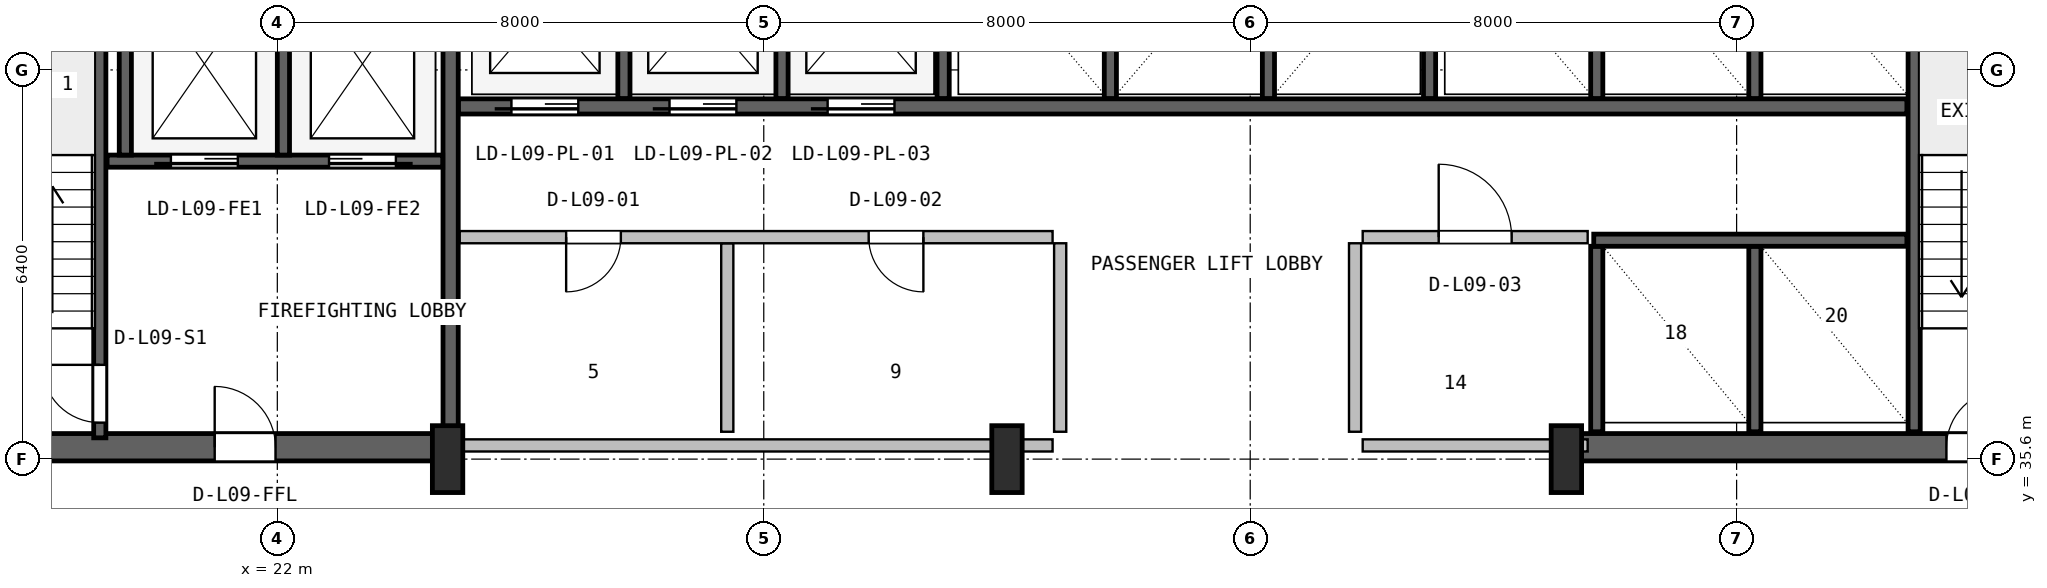
"""IFC4 building model, lengths in metres.
Left out: names, types, materials, properties, quantities, classifications, styles, units other than length and angle.
Written with IfcOpenShell. Run it as: python <this file> out.ifc"""

import sys

from ifc_helpers import new_model, si_unit, direction, frame, frame_2d, origin, origin_2d, place, context, subcontext, project, spatial, rectangle, i_section, extrude, source, transform, mapped, element, fill, save


model = new_model("IFC4")
c1 = context("Model", 3, precision=1e-05, world=origin(), true_north=direction((0.0, 1.0)))
c2 = subcontext(c1, "Body", "Model", "MODEL_VIEW")
j1 = project(units=[si_unit("LENGTHUNIT", "METRE"), si_unit("PLANEANGLEUNIT", "RADIAN")], contexts=[c1])
p1 = place(None, origin())
s1 = spatial("IfcSite", under=j1, at=p1, CompositionType="ELEMENT")
p2 = place(p1, origin())
s2 = spatial("IfcBuilding", under=s1, at=p2, CompositionType="ELEMENT")
p3 = place(p2, frame((0.0, 0.0, 43.2)))
s3 = spatial("IfcBuildingStorey", under=s2, at=p3, CompositionType="ELEMENT", Elevation=43.2)
p4 = place(p3, frame((15.57, 35.795, 0.0), z_axis=(0.0, 0.0, 1.0), x_axis=(1.0, 0.0, 0.0)))
e1 = element("IfcWall", 1, at=p4, inside=s3, PredefinedType="SHEAR", context=c2, shape_type="SweptSolid", body=[
    extrude(rectangle(XDim=9.23, YDim=0.45, at=frame_2d((4.615, 0.0))), origin(), (0.0, 0.0, 1.0), 3.65),
])
p5 = place(p4, frame((5.4, 0.0, 0.0)))
e2 = element("IfcOpeningElement", 2, at=p5, cuts=e1, PredefinedType="OPENING", context=c2, shape_type="SweptSolid", body=[
    extrude(rectangle(XDim=1.0, YDim=2.1, at=frame_2d((0.5, 1.05))), frame((0.0, 0.235, 0.0), z_axis=(0.0, -1.0, 0.0), x_axis=(1.0, 0.0, 0.0)), (0.0, 0.0, 1.0), 0.47),
])
p6 = place(p3, frame((43.2, 35.795, 0.0), z_axis=(0.0, 0.0, 1.0), x_axis=(1.0, 0.0, 0.0)))
e3 = element("IfcWall", 3, at=p6, inside=s3, PredefinedType="SHEAR", context=c2, shape_type="SweptSolid", body=[
    extrude(rectangle(XDim=9.23, YDim=0.45, at=frame_2d((4.615, 0.0))), origin(), (0.0, 0.0, 1.0), 3.65),
])
p7 = place(p6, frame((6.25, 0.0, 0.0)))
e4 = element("IfcOpeningElement", 4, at=p7, cuts=e3, PredefinedType="OPENING", context=c2, shape_type="SweptSolid", body=[
    extrude(rectangle(XDim=0.95, YDim=2.1, at=frame_2d((0.475, 1.05))), frame((0.0, 0.235, 0.0), z_axis=(0.0, -1.0, 0.0), x_axis=(1.0, 0.0, 0.0)), (0.0, 0.0, 1.0), 0.47),
])
m1 = source(origin(), c2, "Body", "SweptSolid", [
    extrude(i_section(OverallWidth=0.5, OverallDepth=1.1, WebThickness=0.018, FlangeThickness=0.032, FilletRadius=0.018, at=origin_2d()), origin(), (0.0, 0.0, 1.0), 3.9),
])
for number, where, z_axis, x_axis in (
    (5, (24.8, 35.6, 0.0), (0.0, 0.0, 1.0), (1.0, 0.0, 0.0)),
    (6, (34.0, 35.6, 0.0), (0.0, 0.0, 1.0), (1.0, 0.0, 0.0)),
    (7, (43.2, 35.6, 0.0), (0.0, 0.0, 1.0), (1.0, 0.0, 0.0)),
):
    element("IfcColumn", number, at=place(p3, frame(where, z_axis=z_axis, x_axis=x_axis)), inside=s3, PredefinedType="COLUMN", context=c2, shape_type="MappedRepresentation", body=[
        mapped(m1, transform((0.0, 0.0, 0.0), x_axis=(1.0, 0.0, 0.0), y_axis=(0.0, 1.0, 0.0), z_axis=(0.0, 0.0, 1.0), scale=1.0)),
    ])
p8 = place(p3, frame((19.08, 35.95, 0.0), z_axis=(0.0, 0.0, 1.0), x_axis=(0.0, 1.0, 0.0)))
e8 = element("IfcWall", 8, at=p8, inside=s3, PredefinedType="SHEAR", context=c2, shape_type="SweptSolid", body=[
    extrude(rectangle(XDim=9.65, YDim=0.2, at=frame_2d((4.825, 0.0))), origin(), (0.0, 0.0, 1.0), 3.65),
])
p9 = place(p8, frame((0.25, 0.0, 0.0)))
e9 = element("IfcOpeningElement", 9, at=p9, cuts=e8, PredefinedType="OPENING", context=c2, shape_type="SweptSolid", body=[
    extrude(rectangle(XDim=0.95, YDim=2.1, at=frame_2d((0.475, 1.05))), frame((0.0, 0.11, 0.0), z_axis=(0.0, -1.0, 0.0), x_axis=(1.0, 0.0, 0.0)), (0.0, 0.0, 1.0), 0.22),
])
p10 = place(p3, frame((24.85, 36.05, 0.0), z_axis=(0.0, 0.0, 1.0), x_axis=(0.0, 1.0, 0.0)))
e10 = element("IfcWall", 10, at=p10, inside=s3, PredefinedType="SHEAR", context=c2, shape_type="SweptSolid", body=[
    extrude(rectangle(XDim=10.45, YDim=0.25, at=frame_2d((5.225, 0.0))), origin(), (0.0, 0.0, 1.0), 3.65),
])
p11 = place(p3, frame((19.2, 40.5, 0.0), z_axis=(0.0, 0.0, 1.0), x_axis=(1.0, 0.0, 0.0)))
e11 = element("IfcWall", 11, at=p11, inside=s3, PredefinedType="SHEAR", context=c2, shape_type="SweptSolid", body=[
    extrude(rectangle(XDim=5.52, YDim=0.2, at=frame_2d((2.76, 0.0))), origin(), (0.0, 0.0, 1.0), 3.65),
])
p12 = place(p11, frame((1.05, 0.0, 0.0)))
e12 = element("IfcOpeningElement", 12, at=p12, cuts=e11, PredefinedType="OPENING", context=c2, shape_type="SweptSolid", body=[
    extrude(rectangle(XDim=1.1, YDim=2.18, at=frame_2d((0.55, 1.09))), frame((0.0, 0.11, 0.0), z_axis=(0.0, -1.0, 0.0), x_axis=(1.0, 0.0, 0.0)), (0.0, 0.0, 1.0), 0.22),
])
p13 = place(p11, frame((3.65, 0.0, 0.0)))
e13 = element("IfcOpeningElement", 13, at=p13, cuts=e11, PredefinedType="OPENING", context=c2, shape_type="SweptSolid", body=[
    extrude(rectangle(XDim=1.1, YDim=2.18, at=frame_2d((0.55, 1.09))), frame((0.0, 0.11, 0.0), z_axis=(0.0, -1.0, 0.0), x_axis=(1.0, 0.0, 0.0)), (0.0, 0.0, 1.0), 0.22),
])
p14 = place(p3, frame((22.1, 40.6, 0.0), z_axis=(0.0, 0.0, 1.0), x_axis=(0.0, 1.0, 0.0)))
e14 = element("IfcWall", 14, at=p14, inside=s3, PredefinedType="SHEAR", context=c2, shape_type="SweptSolid", body=[
    extrude(rectangle(XDim=3.0, YDim=0.2, at=frame_2d((1.5, 0.0))), origin(), (0.0, 0.0, 1.0), 3.65),
])
p15 = place(p3, frame((19.5, 40.6, 0.0), z_axis=(0.0, 0.0, 1.0), x_axis=(0.0, 1.0, 0.0)))
e15 = element("IfcWall", 15, at=p15, inside=s3, PredefinedType="SHEAR", context=c2, shape_type="SweptSolid", body=[
    extrude(rectangle(XDim=5.95, YDim=0.2, at=frame_2d((2.975, 0.0))), origin(), (0.0, 0.0, 1.0), 3.65),
])
p16 = place(p3, frame((48.92, 36.05, 0.0), z_axis=(0.0, 0.0, 1.0), x_axis=(0.0, 1.0, 0.0)))
e16 = element("IfcWall", 16, at=p16, inside=s3, PredefinedType="SHEAR", context=c2, shape_type="SweptSolid", body=[
    extrude(rectangle(XDim=10.5, YDim=0.2, at=frame_2d((5.25, 0.0))), origin(), (0.0, 0.0, 1.0), 3.65),
])
p17 = place(p3, frame((24.98, 41.4, 0.0), z_axis=(0.0, 0.0, 1.0), x_axis=(1.0, 0.0, 0.0)))
e17 = element("IfcWall", 17, at=p17, inside=s3, PredefinedType="SHEAR", context=c2, shape_type="SweptSolid", body=[
    extrude(rectangle(XDim=23.82, YDim=0.25, at=frame_2d((11.91, 0.0))), origin(), (0.0, 0.0, 1.0), 3.65),
])
p18 = place(p17, frame((0.87, 0.0, 0.0)))
e18 = element("IfcOpeningElement", 18, at=p18, cuts=e17, PredefinedType="OPENING", context=c2, shape_type="SweptSolid", body=[
    extrude(rectangle(XDim=1.1, YDim=2.18, at=frame_2d((0.55, 1.09))), frame((0.0, 0.135, 0.0), z_axis=(0.0, -1.0, 0.0), x_axis=(1.0, 0.0, 0.0)), (0.0, 0.0, 1.0), 0.27),
])
p19 = place(p17, frame((3.47, 0.0, 0.0)))
e19 = element("IfcOpeningElement", 19, at=p19, cuts=e17, PredefinedType="OPENING", context=c2, shape_type="SweptSolid", body=[
    extrude(rectangle(XDim=1.1, YDim=2.18, at=frame_2d((0.55, 1.09))), frame((0.0, 0.135, 0.0), z_axis=(0.0, -1.0, 0.0), x_axis=(1.0, 0.0, 0.0)), (0.0, 0.0, 1.0), 0.27),
])
p20 = place(p17, frame((6.07, 0.0, 0.0)))
e20 = element("IfcOpeningElement", 20, at=p20, cuts=e17, PredefinedType="OPENING", context=c2, shape_type="SweptSolid", body=[
    extrude(rectangle(XDim=1.1, YDim=2.18, at=frame_2d((0.55, 1.09))), frame((0.0, 0.135, 0.0), z_axis=(0.0, -1.0, 0.0), x_axis=(1.0, 0.0, 0.0)), (0.0, 0.0, 1.0), 0.27),
])
for number, where, z_axis, x_axis in (
    (21, (27.7, 41.53, 0.0), (0.0, 0.0, 1.0), (0.0, 1.0, 0.0)),
    (22, (30.3, 41.53, 0.0), (0.0, 0.0, 1.0), (0.0, 1.0, 0.0)),
):
    element("IfcWall", number, at=place(p3, frame(where, z_axis=z_axis, x_axis=x_axis)), inside=s3, PredefinedType="SHEAR", context=c2, shape_type="SweptSolid", body=[
        extrude(rectangle(XDim=2.87, YDim=0.2, at=frame_2d((1.435, 0.0))), origin(), (0.0, 0.0, 1.0), 3.65),
    ])
p21 = place(p3, frame((32.95, 41.53, 0.0), z_axis=(0.0, 0.0, 1.0), x_axis=(0.0, 1.0, 0.0)))
e23 = element("IfcWall", 23, at=p21, inside=s3, PredefinedType="SHEAR", context=c2, shape_type="SweptSolid", body=[
    extrude(rectangle(XDim=5.02, YDim=0.2, at=frame_2d((2.51, 0.0))), origin(), (0.0, 0.0, 1.0), 3.65),
])
for number, where, z_axis, x_axis in (
    (24, (35.7, 41.53, 0.0), (0.0, 0.0, 1.0), (0.0, 1.0, 0.0)),
    (25, (38.3, 41.53, 0.0), (0.0, 0.0, 1.0), (0.0, 1.0, 0.0)),
):
    element("IfcWall", number, at=place(p3, frame(where, z_axis=z_axis, x_axis=x_axis)), inside=s3, PredefinedType="SHEAR", context=c2, shape_type="SweptSolid", body=[
        extrude(rectangle(XDim=2.87, YDim=0.2, at=frame_2d((1.435, 0.0))), origin(), (0.0, 0.0, 1.0), 3.65),
    ])
p22 = place(p3, frame((40.95, 41.53, 0.0), z_axis=(0.0, 0.0, 1.0), x_axis=(0.0, 1.0, 0.0)))
e26 = element("IfcWall", 26, at=p22, inside=s3, PredefinedType="SHEAR", context=c2, shape_type="SweptSolid", body=[
    extrude(rectangle(XDim=5.02, YDim=0.2, at=frame_2d((2.51, 0.0))), origin(), (0.0, 0.0, 1.0), 3.65),
])
for number, where, z_axis, x_axis in (
    (27, (43.7, 41.53, 0.0), (0.0, 0.0, 1.0), (0.0, 1.0, 0.0)),
    (28, (46.3, 41.53, 0.0), (0.0, 0.0, 1.0), (0.0, 1.0, 0.0)),
):
    element("IfcWall", number, at=place(p3, frame(where, z_axis=z_axis, x_axis=x_axis)), inside=s3, PredefinedType="SHEAR", context=c2, shape_type="SweptSolid", body=[
        extrude(rectangle(XDim=2.87, YDim=0.2, at=frame_2d((1.435, 0.0))), origin(), (0.0, 0.0, 1.0), 3.65),
    ])
for number, where, z_axis, x_axis in (
    (29, (43.7, 36.05, 0.0), (0.0, 0.0, 1.0), (0.0, 1.0, 0.0)),
    (30, (46.3, 36.05, 0.0), (0.0, 0.0, 1.0), (0.0, 1.0, 0.0)),
):
    element("IfcWall", number, at=place(p3, frame(where, z_axis=z_axis, x_axis=x_axis)), inside=s3, PredefinedType="SHEAR", context=c2, shape_type="SweptSolid", body=[
        extrude(rectangle(XDim=3.05, YDim=0.2, at=frame_2d((1.525, 0.0))), origin(), (0.0, 0.0, 1.0), 3.65),
    ])
p23 = place(p3, frame((43.65, 39.2, 0.0), z_axis=(0.0, 0.0, 1.0), x_axis=(1.0, 0.0, 0.0)))
e31 = element("IfcWall", 31, at=p23, inside=s3, PredefinedType="SHEAR", context=c2, shape_type="SweptSolid", body=[
    extrude(rectangle(XDim=5.15, YDim=0.2, at=frame_2d((2.575, 0.0))), origin(), (0.0, 0.0, 1.0), 3.65),
])
p24 = place(p3, frame((25.0, 35.825, 0.0), z_axis=(0.0, 0.0, 1.0), x_axis=(1.0, 0.0, 0.0)))
e32 = element("IfcWall", 32, at=p24, inside=s3, PredefinedType="PLUMBINGWALL", context=c2, shape_type="SweptSolid", body=[
    extrude(rectangle(XDim=9.75, YDim=0.2, at=frame_2d((4.875, 0.0))), origin(), (0.0, 0.0, 1.0), 2.425),
])
p25 = place(p3, frame((29.4, 36.05, 0.0), z_axis=(0.0, 0.0, 1.0), x_axis=(0.0, 1.0, 0.0)))
e33 = element("IfcWall", 33, at=p25, inside=s3, PredefinedType="PLUMBINGWALL", context=c2, shape_type="SweptSolid", body=[
    extrude(rectangle(XDim=3.1, YDim=0.2, at=frame_2d((1.55, 0.0))), origin(), (0.0, 0.0, 1.0), 3.63),
])
p26 = place(p3, frame((25.0, 39.25, 0.0), z_axis=(0.0, 0.0, 1.0), x_axis=(1.0, 0.0, 0.0)))
e34 = element("IfcWall", 34, at=p26, inside=s3, PredefinedType="PLUMBINGWALL", context=c2, shape_type="SweptSolid", body=[
    extrude(rectangle(XDim=9.75, YDim=0.2, at=frame_2d((4.875, 0.0))), origin(), (0.0, 0.0, 1.0), 3.63),
])
p27 = place(p26, frame((1.75, 0.0, 0.0)))
e35 = element("IfcOpeningElement", 35, at=p27, cuts=e34, PredefinedType="OPENING", context=c2, shape_type="SweptSolid", body=[
    extrude(rectangle(XDim=0.9, YDim=2.06, at=frame_2d((0.45, 1.03))), frame((0.0, 0.11, 0.0), z_axis=(0.0, -1.0, 0.0), x_axis=(1.0, 0.0, 0.0)), (0.0, 0.0, 1.0), 0.22),
])
p28 = place(p26, frame((6.725, 0.0, 0.0)))
e36 = element("IfcOpeningElement", 36, at=p28, cuts=e34, PredefinedType="OPENING", context=c2, shape_type="SweptSolid", body=[
    extrude(rectangle(XDim=0.9, YDim=2.06, at=frame_2d((0.45, 1.03))), frame((0.0, 0.11, 0.0), z_axis=(0.0, -1.0, 0.0), x_axis=(1.0, 0.0, 0.0)), (0.0, 0.0, 1.0), 0.22),
])
p29 = place(p3, frame((34.875, 36.05, 0.0), z_axis=(0.0, 0.0, 1.0), x_axis=(0.0, 1.0, 0.0)))
e37 = element("IfcWall", 37, at=p29, inside=s3, PredefinedType="PLUMBINGWALL", context=c2, shape_type="SweptSolid", body=[
    extrude(rectangle(XDim=3.1, YDim=0.2, at=frame_2d((1.55, 0.0))), origin(), (0.0, 0.0, 1.0), 3.63),
])
p30 = place(p3, frame((39.85, 35.825, 0.0), z_axis=(0.0, 0.0, 1.0), x_axis=(1.0, 0.0, 0.0)))
e38 = element("IfcWall", 38, at=p30, inside=s3, PredefinedType="SOLIDWALL", context=c2, shape_type="SweptSolid", body=[
    extrude(rectangle(XDim=3.7, YDim=0.2, at=frame_2d((1.85, 0.0))), origin(), (0.0, 0.0, 1.0), 2.425),
])
p31 = place(p3, frame((39.85, 39.25, 0.0), z_axis=(0.0, 0.0, 1.0), x_axis=(1.0, 0.0, 0.0)))
e39 = element("IfcWall", 39, at=p31, inside=s3, PredefinedType="SOLIDWALL", context=c2, shape_type="SweptSolid", body=[
    extrude(rectangle(XDim=3.7, YDim=0.2, at=frame_2d((1.85, 0.0))), origin(), (0.0, 0.0, 1.0), 3.63),
])
p32 = place(p31, frame((1.25, 0.0, 0.0)))
e40 = element("IfcOpeningElement", 40, at=p32, cuts=e39, PredefinedType="OPENING", context=c2, shape_type="SweptSolid", body=[
    extrude(rectangle(XDim=1.2, YDim=2.1, at=frame_2d((0.6, 1.05))), frame((0.0, 0.11, 0.0), z_axis=(0.0, -1.0, 0.0), x_axis=(1.0, 0.0, 0.0)), (0.0, 0.0, 1.0), 0.22),
])
p33 = place(p3, frame((39.725, 36.05, 0.0), z_axis=(0.0, 0.0, 1.0), x_axis=(0.0, 1.0, 0.0)))
e41 = element("IfcWall", 41, at=p33, inside=s3, PredefinedType="SOLIDWALL", context=c2, shape_type="SweptSolid", body=[
    extrude(rectangle(XDim=3.1, YDim=0.2, at=frame_2d((1.55, 0.0))), origin(), (0.0, 0.0, 1.0), 3.63),
])
m2 = source(origin(), c2, "Body", "SweptSolid", [
    extrude(rectangle(XDim=0.95, YDim=2.1, at=frame_2d((0.475, 1.05))), frame((0.0, 0.025, 0.0), z_axis=(0.0, -1.0, 0.0), x_axis=(1.0, 0.0, 0.0)), (0.0, 0.0, 1.0), 0.05),
])
p34 = place(p9, origin())
e42 = element("IfcDoor", 42, at=p34, inside=s3, OperationType="SINGLE_SWING_RIGHT", PredefinedType="DOOR", context=c2, shape_type="MappedRepresentation", body=[
    mapped(m2, transform((0.0, 0.0, 0.0), x_axis=(1.0, 0.0, 0.0), y_axis=(0.0, 1.0, 0.0), z_axis=(0.0, 0.0, 1.0), scale=1.0)),
])
fill(e9, e42)
m3 = source(origin(), c2, "Body", "SweptSolid", [
    extrude(rectangle(XDim=1.0, YDim=2.1, at=frame_2d((0.5, 1.05))), frame((0.0, 0.025, 0.0), z_axis=(0.0, -1.0, 0.0), x_axis=(1.0, 0.0, 0.0)), (0.0, 0.0, 1.0), 0.05),
])
p35 = place(p5, origin())
e43 = element("IfcDoor", 43, at=p35, inside=s3, OperationType="SINGLE_SWING_LEFT", PredefinedType="DOOR", context=c2, shape_type="MappedRepresentation", body=[
    mapped(m3, transform((0.0, 0.0, 0.0), x_axis=(1.0, 0.0, 0.0), y_axis=(0.0, 1.0, 0.0), z_axis=(0.0, 0.0, 1.0), scale=1.0)),
])
fill(e2, e43)
m4 = source(origin(), c2, "Body", "SweptSolid", [
    extrude(rectangle(XDim=1.1, YDim=2.18, at=frame_2d((0.55, 1.09))), frame((0.0, 0.025, 0.0), z_axis=(0.0, -1.0, 0.0), x_axis=(1.0, 0.0, 0.0)), (0.0, 0.0, 1.0), 0.05),
])
p36 = place(p12, frame((1.1, 0.0, 0.0), z_axis=(0.0, 0.0, 1.0), x_axis=(-1.0, 0.0, 0.0)))
e44 = element("IfcDoor", 44, at=p36, inside=s3, OperationType="SLIDING_TO_LEFT", PredefinedType="DOOR", context=c2, shape_type="MappedRepresentation", body=[
    mapped(m4, transform((0.0, 0.0, 0.0), x_axis=(1.0, 0.0, 0.0), y_axis=(0.0, 1.0, 0.0), z_axis=(0.0, 0.0, 1.0), scale=1.0)),
])
fill(e12, e44)
p37 = place(p13, frame((1.1, 0.0, 0.0), z_axis=(0.0, 0.0, 1.0), x_axis=(-1.0, 0.0, 0.0)))
e45 = element("IfcDoor", 45, at=p37, inside=s3, OperationType="SLIDING_TO_RIGHT", PredefinedType="DOOR", context=c2, shape_type="MappedRepresentation", body=[
    mapped(m4, transform((0.0, 0.0, 0.0), x_axis=(1.0, 0.0, 0.0), y_axis=(0.0, 1.0, 0.0), z_axis=(0.0, 0.0, 1.0), scale=1.0)),
])
fill(e13, e45)
p38 = place(p7, origin())
e46 = element("IfcDoor", 46, at=p38, inside=s3, OperationType="SINGLE_SWING_RIGHT", PredefinedType="DOOR", context=c2, shape_type="MappedRepresentation", body=[
    mapped(m2, transform((0.0, 0.0, 0.0), x_axis=(1.0, 0.0, 0.0), y_axis=(0.0, 1.0, 0.0), z_axis=(0.0, 0.0, 1.0), scale=1.0)),
])
fill(e4, e46)
p39 = place(p18, frame((1.1, 0.0, 0.0), z_axis=(0.0, 0.0, 1.0), x_axis=(-1.0, 0.0, 0.0)))
e47 = element("IfcDoor", 47, at=p39, inside=s3, OperationType="SLIDING_TO_LEFT", PredefinedType="DOOR", context=c2, shape_type="MappedRepresentation", body=[
    mapped(m4, transform((0.0, 0.0, 0.0), x_axis=(1.0, 0.0, 0.0), y_axis=(0.0, 1.0, 0.0), z_axis=(0.0, 0.0, 1.0), scale=1.0)),
])
fill(e18, e47)
p40 = place(p19, frame((1.1, 0.0, 0.0), z_axis=(0.0, 0.0, 1.0), x_axis=(-1.0, 0.0, 0.0)))
e48 = element("IfcDoor", 48, at=p40, inside=s3, OperationType="SLIDING_TO_LEFT", PredefinedType="DOOR", context=c2, shape_type="MappedRepresentation", body=[
    mapped(m4, transform((0.0, 0.0, 0.0), x_axis=(1.0, 0.0, 0.0), y_axis=(0.0, 1.0, 0.0), z_axis=(0.0, 0.0, 1.0), scale=1.0)),
])
fill(e19, e48)
p41 = place(p20, frame((1.1, 0.0, 0.0), z_axis=(0.0, 0.0, 1.0), x_axis=(-1.0, 0.0, 0.0)))
e49 = element("IfcDoor", 49, at=p41, inside=s3, OperationType="SLIDING_TO_LEFT", PredefinedType="DOOR", context=c2, shape_type="MappedRepresentation", body=[
    mapped(m4, transform((0.0, 0.0, 0.0), x_axis=(1.0, 0.0, 0.0), y_axis=(0.0, 1.0, 0.0), z_axis=(0.0, 0.0, 1.0), scale=1.0)),
])
fill(e20, e49)
m5 = source(origin(), c2, "Body", "SweptSolid", [
    extrude(rectangle(XDim=0.9, YDim=2.06, at=frame_2d((0.45, 1.03))), frame((0.0, 0.025, 0.0), z_axis=(0.0, -1.0, 0.0), x_axis=(1.0, 0.0, 0.0)), (0.0, 0.0, 1.0), 0.05),
])
p42 = place(p27, frame((0.9, 0.0, 0.0), z_axis=(0.0, 0.0, 1.0), x_axis=(-1.0, 0.0, 0.0)))
e50 = element("IfcDoor", 50, at=p42, inside=s3, OperationType="SINGLE_SWING_LEFT", PredefinedType="DOOR", context=c2, shape_type="MappedRepresentation", body=[
    mapped(m5, transform((0.0, 0.0, 0.0), x_axis=(1.0, 0.0, 0.0), y_axis=(0.0, 1.0, 0.0), z_axis=(0.0, 0.0, 1.0), scale=1.0)),
])
fill(e35, e50)
p43 = place(p28, frame((0.9, 0.0, 0.0), z_axis=(0.0, 0.0, 1.0), x_axis=(-1.0, 0.0, 0.0)))
e51 = element("IfcDoor", 51, at=p43, inside=s3, OperationType="SINGLE_SWING_RIGHT", PredefinedType="DOOR", context=c2, shape_type="MappedRepresentation", body=[
    mapped(m5, transform((0.0, 0.0, 0.0), x_axis=(1.0, 0.0, 0.0), y_axis=(0.0, 1.0, 0.0), z_axis=(0.0, 0.0, 1.0), scale=1.0)),
])
fill(e36, e51)
m6 = source(origin(), c2, "Body", "SweptSolid", [
    extrude(rectangle(XDim=1.2, YDim=2.1, at=frame_2d((0.6, 1.05))), frame((0.0, 0.025, 0.0), z_axis=(0.0, -1.0, 0.0), x_axis=(1.0, 0.0, 0.0)), (0.0, 0.0, 1.0), 0.05),
])
p44 = place(p32, origin())
e52 = element("IfcDoor", 52, at=p44, inside=s3, OperationType="SINGLE_SWING_LEFT", PredefinedType="DOOR", context=c2, shape_type="MappedRepresentation", body=[
    mapped(m6, transform((0.0, 0.0, 0.0), x_axis=(1.0, 0.0, 0.0), y_axis=(0.0, 1.0, 0.0), z_axis=(0.0, 0.0, 1.0), scale=1.0)),
])
fill(e40, e52)
save(model, sys.argv[1])
